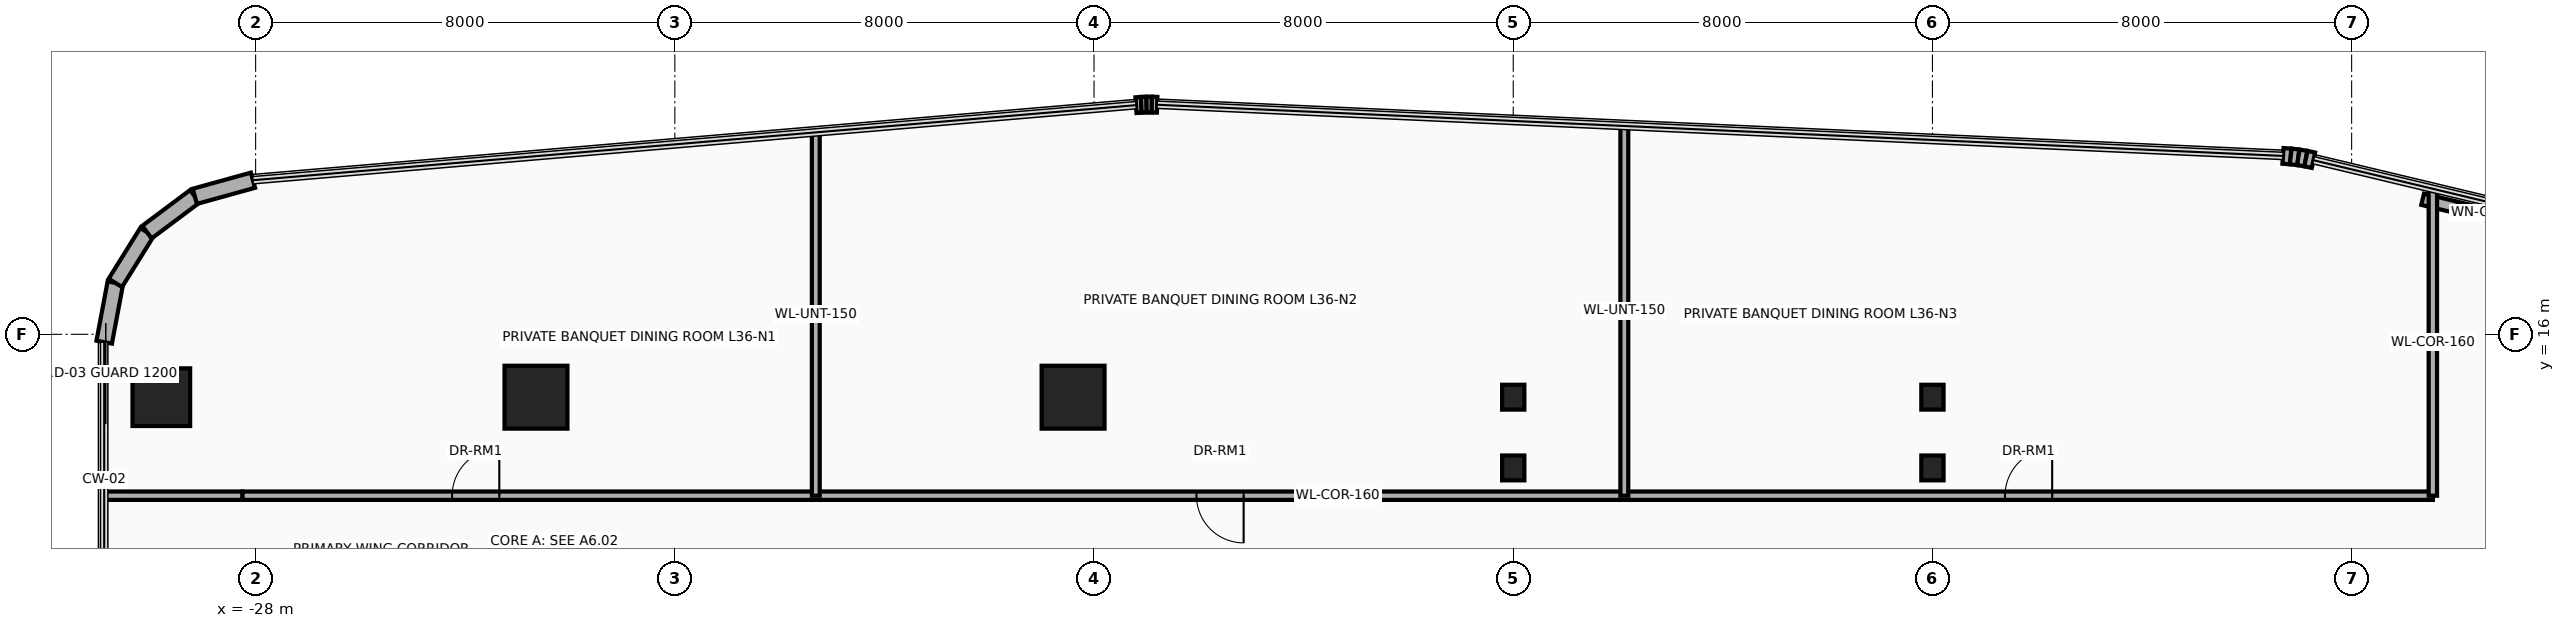
"""IFC4 building model, lengths in metres.
Left out: names, types, materials, properties, quantities, classifications, styles, units other than length and angle.
Written with IfcOpenShell. Run it as: python <this file> out.ifc"""

import sys

from ifc_helpers import new_model, si_unit, direction, frame, frame_2d, origin, origin_2d, place, context, subcontext, project, spatial, rectangle, circle, i_section, extrude, source, transform, mapped, element, fill, save


model = new_model("IFC4")
c1 = context("Model", 3, precision=1e-05, world=origin(), true_north=direction((0.0, 1.0)))
c2 = subcontext(c1, "Body", "Model", "MODEL_VIEW")
j1 = project(units=[si_unit("LENGTHUNIT", "METRE"), si_unit("PLANEANGLEUNIT", "RADIAN")], contexts=[c1])
p1 = place(None, origin())
s1 = spatial("IfcSite", under=j1, at=p1, CompositionType="ELEMENT")
p2 = place(p1, origin())
s2 = spatial("IfcBuilding", under=s1, at=p2, CompositionType="ELEMENT")
p3 = place(p2, frame((0.0, 0.0, 142.7)))
s3 = spatial("IfcBuildingStorey", under=s2, at=p3, CompositionType="ELEMENT", Elevation=142.7)
m1 = source(origin(), c2, "Body", "SweptSolid", [
    extrude(circle(Radius=0.55, at=origin_2d()), origin(), (0.0, 0.0, 1.0), 3.7),
])
p4 = place(p3, frame((-29.8, 14.8, 0.0), z_axis=(0.0, 0.0, 1.0), x_axis=(1.0, 0.0, 0.0)))
e1 = element("IfcColumn", 1, at=p4, inside=s3, PredefinedType="COLUMN", context=c2, shape_type="MappedRepresentation", body=[
    mapped(m1, transform((0.0, 0.0, 0.0), x_axis=(1.0, 0.0, 0.0), y_axis=(0.0, 1.0, 0.0), z_axis=(0.0, 0.0, 1.0), scale=1.0)),
])
m2 = source(origin(), c2, "Body", "SweptSolid", [
    extrude(rectangle(XDim=1.2, YDim=1.2, at=origin_2d()), origin(), (0.0, 0.0, 1.0), 3.7),
])
for number, where, z_axis, x_axis in (
    (2, (-22.65, 14.8, 0.0), (0.0, 0.0, 1.0), (1.0, 0.0, 0.0)),
    (3, (-12.4, 14.8, 0.0), (0.0, 0.0, 1.0), (1.0, 0.0, 0.0)),
):
    element("IfcColumn", number, at=place(p3, frame(where, z_axis=z_axis, x_axis=x_axis)), inside=s3, PredefinedType="COLUMN", context=c2, shape_type="MappedRepresentation", body=[
        mapped(m2, transform((0.0, 0.0, 0.0), x_axis=(1.0, 0.0, 0.0), y_axis=(0.0, 1.0, 0.0), z_axis=(0.0, 0.0, 1.0), scale=1.0)),
    ])
m3 = source(origin(), c2, "Body", "SweptSolid", [
    extrude(i_section(OverallWidth=0.424, OverallDepth=0.474, WebThickness=0.048, FlangeThickness=0.077, at=origin_2d()), origin(), (0.0, 0.0, 1.0), 3.7),
])
for number, where, z_axis, x_axis in (
    (4, (-4.0, 13.45, 0.0), (0.0, 0.0, 1.0), (1.0, 0.0, 0.0)),
    (5, (-4.0, 14.8, 0.0), (0.0, 0.0, 1.0), (1.0, 0.0, 0.0)),
    (6, (4.0, 13.45, 0.0), (0.0, 0.0, 1.0), (1.0, 0.0, 0.0)),
    (7, (4.0, 14.8, 0.0), (0.0, 0.0, 1.0), (1.0, 0.0, 0.0)),
):
    element("IfcColumn", number, at=place(p3, frame(where, z_axis=z_axis, x_axis=x_axis)), inside=s3, PredefinedType="COLUMN", context=c2, shape_type="MappedRepresentation", body=[
        mapped(m3, transform((0.0, 0.0, 0.0), x_axis=(1.0, 0.0, 0.0), y_axis=(0.0, 1.0, 0.0), z_axis=(0.0, 0.0, 1.0), scale=1.0)),
    ])
p5 = place(p3, frame((-30.89, 15.85, 0.0), z_axis=(0.0, 0.0, 1.0), x_axis=(0.184557499391, 0.982821718023, 0.0)))
e8 = element("IfcWall", 8, at=p5, inside=s3, PredefinedType="SOLIDWALL", context=c2, shape_type="SweptSolid", body=[
    extrude(rectangle(XDim=1.151, YDim=0.3, at=frame_2d((0.575, 0.0))), origin(), (0.0, 0.0, 1.0), 3.46),
])
p6 = place(p3, frame((-30.677, 16.981, 0.0), z_axis=(0.0, 0.0, 1.0), x_axis=(0.52880576008, 0.848742875143, 0.0)))
e9 = element("IfcWall", 9, at=p6, inside=s3, PredefinedType="SOLIDWALL", context=c2, shape_type="SweptSolid", body=[
    extrude(rectangle(XDim=1.141, YDim=0.3, at=frame_2d((0.57, 0.0))), origin(), (0.0, 0.0, 1.0), 3.46),
])
p7 = place(p3, frame((-30.074, 17.95, 0.0), z_axis=(0.0, 0.0, 1.0), x_axis=(0.800975009324, 0.598697782223, 0.0)))
e10 = element("IfcWall", 10, at=p7, inside=s3, PredefinedType="SOLIDWALL", context=c2, shape_type="SweptSolid", body=[
    extrude(rectangle(XDim=1.141, YDim=0.3, at=frame_2d((0.57, 0.0))), origin(), (0.0, 0.0, 1.0), 3.46),
])
p8 = place(p3, frame((-29.161, 18.633, 0.0), z_axis=(0.0, 0.0, 1.0), x_axis=(0.963624193367, 0.267260947313, 0.0)))
e11 = element("IfcWall", 11, at=p8, inside=s3, PredefinedType="SOLIDWALL", context=c2, shape_type="SweptSolid", body=[
    extrude(rectangle(XDim=1.151, YDim=0.3, at=frame_2d((0.575, 0.0))), origin(), (0.0, 0.0, 1.0), 3.46),
])
p9 = place(p3, frame((-11.199, 20.373, 0.0), z_axis=(0.0, 0.0, 1.0), x_axis=(0.997567332166, 0.069709524416, 0.0)))
e12 = element("IfcWall", 12, at=p9, inside=s3, PredefinedType="SOLIDWALL", context=c2, shape_type="SweptSolid", body=[
    extrude(rectangle(XDim=0.102, YDim=0.3, at=frame_2d((0.051, 0.0))), origin(), (0.0, 0.0, 1.0), 3.46),
])
p10 = place(p3, frame((-11.098, 20.38, 0.0), z_axis=(0.0, 0.0, 1.0), x_axis=(0.999334672785, 0.03647206835, 0.0)))
e13 = element("IfcWall", 13, at=p10, inside=s3, PredefinedType="SOLIDWALL", context=c2, shape_type="SweptSolid", body=[
    extrude(rectangle(XDim=0.1, YDim=0.3, at=frame_2d((0.05, 0.0))), origin(), (0.0, 0.0, 1.0), 3.46),
])
p11 = place(p3, frame((-10.998, 20.383, 0.0), z_axis=(0.0, 0.0, 1.0), x_axis=(0.999997054401, 0.002427177317, 0.0)))
e14 = element("IfcWall", 14, at=p11, inside=s3, PredefinedType="SOLIDWALL", context=c2, shape_type="SweptSolid", body=[
    extrude(rectangle(XDim=0.101, YDim=0.3, at=frame_2d((0.05, 0.0))), origin(), (0.0, 0.0, 1.0), 3.46),
])
p12 = place(p3, frame((-10.897, 20.384, 0.0), z_axis=(0.0, 0.0, 1.0), x_axis=(0.999584209171, -0.02883415988, 0.0)))
e15 = element("IfcWall", 15, at=p12, inside=s3, PredefinedType="SOLIDWALL", context=c2, shape_type="SweptSolid", body=[
    extrude(rectangle(XDim=0.102, YDim=0.3, at=frame_2d((0.051, 0.0))), origin(), (0.0, 0.0, 1.0), 3.46),
])
p13 = place(p3, frame((10.69, 19.404, 0.0), z_axis=(0.0, 0.0, 1.0), x_axis=(0.99758310784, -0.069483400546, 0.0)))
e16 = element("IfcWall", 16, at=p13, inside=s3, PredefinedType="SOLIDWALL", context=c2, shape_type="SweptSolid", body=[
    extrude(rectangle(XDim=0.147, YDim=0.3, at=frame_2d((0.074, 0.0))), origin(), (0.0, 0.0, 1.0), 3.46),
])
for number, where, z_axis, x_axis in (
    (17, (10.837, 19.394, 0.0), (0.0, 0.0, 1.0), (0.993, -0.117, 0.0)),
    (18, (10.983, 19.377, 0.0), (0.0, 0.0, 1.0), (0.987, -0.163, 0.0)),
):
    element("IfcWall", number, at=place(p3, frame(where, z_axis=z_axis, x_axis=x_axis)), inside=s3, PredefinedType="SOLIDWALL", context=c2, shape_type="SweptSolid", body=[
        extrude(rectangle(XDim=0.146, YDim=0.3, at=frame_2d((0.073, 0.0))), origin(), (0.0, 0.0, 1.0), 3.46),
    ])
p14 = place(p3, frame((11.127, 19.353, 0.0), z_axis=(0.0, 0.0, 1.0), x_axis=(0.978019841688, -0.208511844421, 0.0)))
e19 = element("IfcWall", 19, at=p14, inside=s3, PredefinedType="SOLIDWALL", context=c2, shape_type="SweptSolid", body=[
    extrude(rectangle(XDim=0.147, YDim=0.3, at=frame_2d((0.074, 0.0))), origin(), (0.0, 0.0, 1.0), 3.46),
])
p15 = place(p3, frame((13.355, 18.576, 0.0), z_axis=(0.0, 0.0, 1.0), x_axis=(0.97252211384, -0.232810519721, 0.0)))
e20 = element("IfcWall", 20, at=p15, inside=s3, PredefinedType="SOLIDWALL", context=c2, shape_type="SweptSolid", body=[
    extrude(rectangle(XDim=2.2, YDim=0.22, at=frame_2d((1.1, 0.0))), origin(), (0.0, 0.0, 1.0), 3.46),
])
p16 = place(p15, frame((0.65, 0.0, 0.95)))
e21 = element("IfcOpeningElement", 21, at=p16, cuts=e20, PredefinedType="OPENING", context=c2, shape_type="SweptSolid", body=[
    extrude(rectangle(XDim=0.9, YDim=1.3, at=frame_2d((0.45, 0.65))), frame((0.0, 0.125, 0.0), z_axis=(0.0, -1.0, 0.0), x_axis=(1.0, 0.0, 0.0)), (0.0, 0.0, 1.0), 0.25),
])
p17 = place(p3, frame((-30.89, 12.92, 0.0), z_axis=(0.0, 0.0, 1.0), x_axis=(1.0, 0.0, 0.0)))
e22 = element("IfcWall", 22, at=p17, inside=s3, PredefinedType="PARTITIONING", context=c2, shape_type="SweptSolid", body=[
    extrude(rectangle(XDim=2.64, YDim=0.16, at=frame_2d((1.32, 0.0))), origin(), (0.0, 0.0, 1.0), 2.896),
])
p18 = place(p3, frame((-28.25, 12.92, 0.0), z_axis=(0.0, 0.0, 1.0), x_axis=(1.0, 0.0, 0.0)))
e23 = element("IfcWall", 23, at=p18, inside=s3, PredefinedType="PARTITIONING", context=c2, shape_type="SweptSolid", body=[
    extrude(rectangle(XDim=41.8, YDim=0.16, at=frame_2d((20.9, 0.0))), origin(), (0.0, 0.0, 1.0), 2.666),
])
p19 = place(p18, frame((4.0, 0.0, 0.0)))
e24 = element("IfcOpeningElement", 24, at=p19, cuts=e23, PredefinedType="OPENING", context=c2, shape_type="SweptSolid", body=[
    extrude(rectangle(XDim=0.9, YDim=2.1, at=frame_2d((0.45, 1.05))), frame((0.0, 0.095, 0.0), z_axis=(0.0, -1.0, 0.0), x_axis=(1.0, 0.0, 0.0)), (0.0, 0.0, 1.0), 0.19),
])
p20 = place(p18, frame((18.205, 0.0, 0.0)))
e25 = element("IfcOpeningElement", 25, at=p20, cuts=e23, PredefinedType="OPENING", context=c2, shape_type="SweptSolid", body=[
    extrude(rectangle(XDim=0.9, YDim=2.1, at=frame_2d((0.45, 1.05))), frame((0.0, 0.095, 0.0), z_axis=(0.0, -1.0, 0.0), x_axis=(1.0, 0.0, 0.0)), (0.0, 0.0, 1.0), 0.19),
])
p21 = place(p18, frame((33.635, 0.0, 0.0)))
e26 = element("IfcOpeningElement", 26, at=p21, cuts=e23, PredefinedType="OPENING", context=c2, shape_type="SweptSolid", body=[
    extrude(rectangle(XDim=0.9, YDim=2.1, at=frame_2d((0.45, 1.05))), frame((0.0, 0.095, 0.0), z_axis=(0.0, -1.0, 0.0), x_axis=(1.0, 0.0, 0.0)), (0.0, 0.0, 1.0), 0.19),
])
p22 = place(p3, frame((13.55, 12.92, 0.0), z_axis=(0.0, 0.0, 1.0), x_axis=(0.0, 1.0, 0.0)))
e27 = element("IfcWall", 27, at=p22, inside=s3, PredefinedType="PARTITIONING", context=c2, shape_type="SweptSolid", body=[
    extrude(rectangle(XDim=5.857, YDim=0.16, at=frame_2d((2.928, 0.0))), origin(), (0.0, 0.0, 1.0), 2.666),
])
p23 = place(p3, frame((-17.31, 12.92, 0.0), z_axis=(0.0, 0.0, 1.0), x_axis=(0.0, 1.0, 0.0)))
e28 = element("IfcWall", 28, at=p23, inside=s3, PredefinedType="PARTITIONING", context=c2, shape_type="SweptSolid", body=[
    extrude(rectangle(XDim=6.933, YDim=0.15, at=frame_2d((3.467, 0.0))), origin(), (0.0, 0.0, 1.0), 2.666),
])
p24 = place(p3, frame((-1.88, 12.92, 0.0), z_axis=(0.0, 0.0, 1.0), x_axis=(0.0, 1.0, 0.0)))
e29 = element("IfcWall", 29, at=p24, inside=s3, PredefinedType="PARTITIONING", context=c2, shape_type="SweptSolid", body=[
    extrude(rectangle(XDim=7.055, YDim=0.15, at=frame_2d((3.528, 0.0))), origin(), (0.0, 0.0, 1.0), 2.666),
])
p25 = place(p16, origin())
e30 = element("IfcWindow", 30, at=p25, inside=s3, PartitioningType="SINGLE_PANEL", PredefinedType="WINDOW", context=c2, shape_type="SweptSolid", body=[
    extrude(rectangle(XDim=0.9, YDim=1.3, at=frame_2d((0.45, 0.65))), frame((0.0, 0.03, 0.0), z_axis=(0.0, -1.0, 0.0), x_axis=(1.0, 0.0, 0.0)), (0.0, 0.0, 1.0), 0.06),
])
fill(e21, e30)
p26 = place(p19, origin())
e31 = element("IfcDoor", 31, at=p26, inside=s3, OperationType="SINGLE_SWING_RIGHT", PredefinedType="DOOR", context=c2, shape_type="SweptSolid", body=[
    extrude(rectangle(XDim=0.9, YDim=2.1, at=frame_2d((0.45, 1.05))), frame((0.0, 0.025, 0.0), z_axis=(0.0, -1.0, 0.0), x_axis=(1.0, 0.0, 0.0)), (0.0, 0.0, 1.0), 0.05),
])
fill(e24, e31)
p27 = place(p20, frame((0.9, 0.0, 0.0), z_axis=(0.0, 0.0, 1.0), x_axis=(-1.0, 0.0, 0.0)))
e32 = element("IfcDoor", 32, at=p27, inside=s3, OperationType="SINGLE_SWING_LEFT", PredefinedType="DOOR", context=c2, shape_type="SweptSolid", body=[
    extrude(rectangle(XDim=0.9, YDim=2.1, at=frame_2d((0.45, 1.05))), frame((0.0, 0.025, 0.0), z_axis=(0.0, -1.0, 0.0), x_axis=(1.0, 0.0, 0.0)), (0.0, 0.0, 1.0), 0.05),
])
fill(e25, e32)
p28 = place(p21, origin())
e33 = element("IfcDoor", 33, at=p28, inside=s3, OperationType="SINGLE_SWING_RIGHT", PredefinedType="DOOR", context=c2, shape_type="SweptSolid", body=[
    extrude(rectangle(XDim=0.9, YDim=2.1, at=frame_2d((0.45, 1.05))), frame((0.0, 0.025, 0.0), z_axis=(0.0, -1.0, 0.0), x_axis=(1.0, 0.0, 0.0)), (0.0, 0.0, 1.0), 0.05),
])
fill(e26, e33)
save(model, sys.argv[1])
